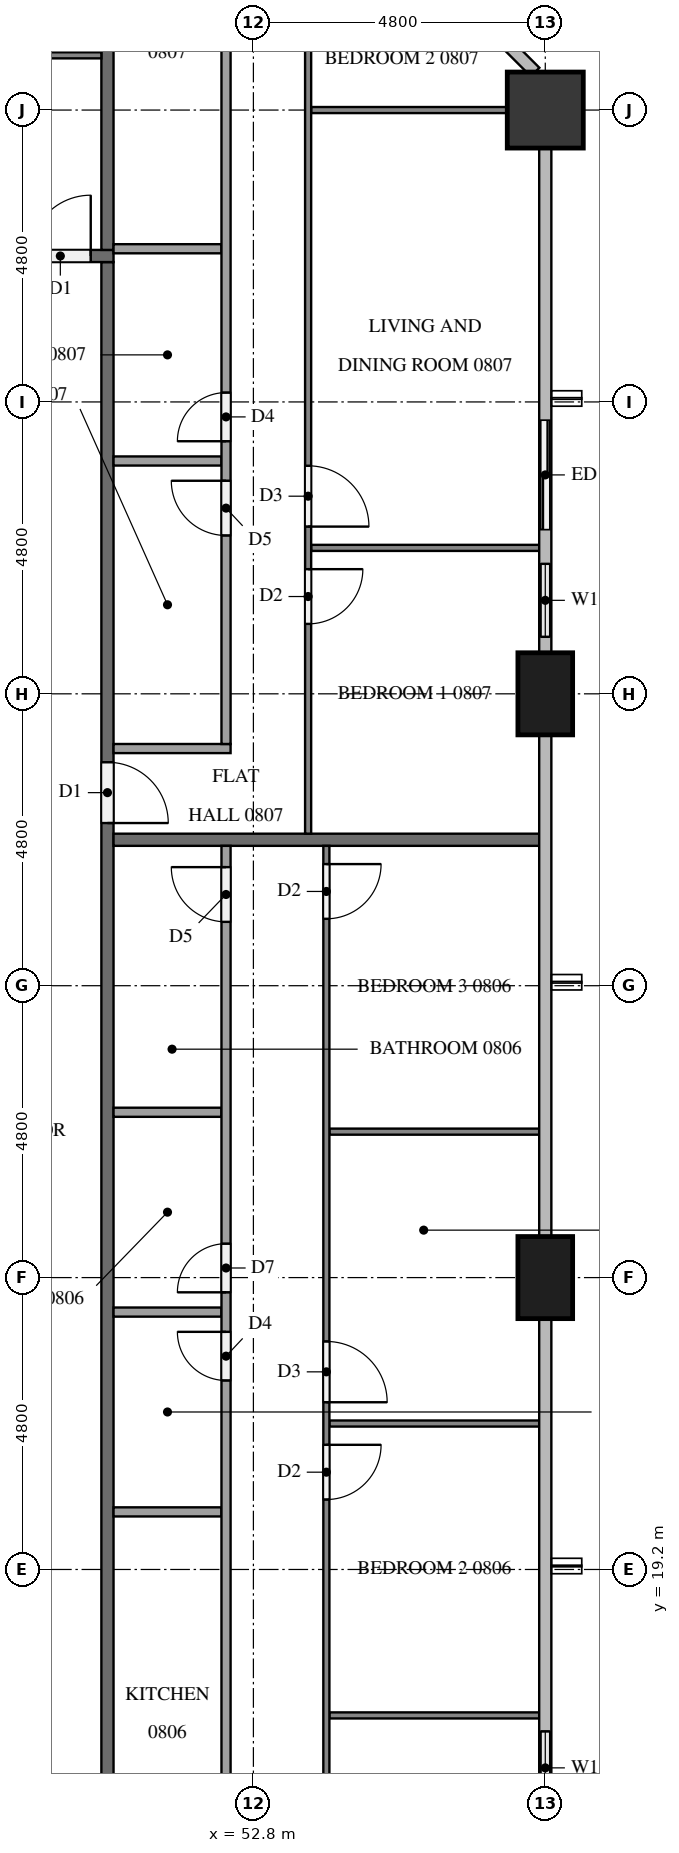
"""IFC4 building model, lengths in metres.
Left out: names, types, materials, properties, quantities, classifications, styles, units other than length and angle.
Written with IfcOpenShell. Run it as: python <this file> out.ifc"""

import sys

from ifc_helpers import new_model, si_unit, direction, frame, frame_2d, origin, origin_2d, place, context, subcontext, project, spatial, rectangle, extrude, element, fill, save


model = new_model("IFC4")
c1 = context("Model", 3, precision=1e-05, world=origin(), true_north=direction((0.0, 1.0)))
c2 = subcontext(c1, "Body", "Model", "MODEL_VIEW")
j1 = project(units=[si_unit("LENGTHUNIT", "METRE"), si_unit("PLANEANGLEUNIT", "RADIAN")], contexts=[c1])
p1 = place(None, origin())
s1 = spatial("IfcSite", under=j1, at=p1, CompositionType="ELEMENT")
p2 = place(p1, origin())
s2 = spatial("IfcBuilding", under=s1, at=p2, CompositionType="ELEMENT")
p3 = place(p2, frame((0.0, 0.0, 36.4)))
s3 = spatial("IfcBuildingStorey", under=s2, at=p3, CompositionType="ELEMENT", Elevation=36.4)
for number, where, z_axis, x_axis in (
    (1, (57.6, 24.0, 0.0), (0.0, 0.0, 1.0), (0.0, 1.0, 0.0)),
    (2, (57.6, 33.6, 0.0), (0.0, 0.0, 1.0), (0.0, 1.0, 0.0)),
):
    element("IfcColumn", number, at=place(p3, frame(where, z_axis=z_axis, x_axis=x_axis)), inside=s3, PredefinedType="COLUMN", context=c2, shape_type="SweptSolid", body=[
        extrude(rectangle(XDim=1.35, YDim=0.9, at=origin_2d()), origin(), (0.0, 0.0, 1.0), 3.2),
    ])
p4 = place(p3, frame((57.6, 43.2, 0.0), z_axis=(0.0, 0.0, 1.0), x_axis=(1.0, 0.0, 0.0)))
e3 = element("IfcColumn", 3, at=p4, inside=s3, PredefinedType="COLUMN", context=c2, shape_type="SweptSolid", body=[
    extrude(rectangle(XDim=1.25, YDim=1.25, at=origin_2d()), origin(), (0.0, 0.0, 1.0), 3.2),
])
p5 = place(p3, frame((57.6, 15.075, 0.0), z_axis=(0.0, 0.0, 1.0), x_axis=(0.0, 1.0, 0.0)))
e4 = element("IfcWall", 4, at=p5, inside=s3, PredefinedType="SOLIDWALL", context=c2, shape_type="SweptSolid", body=[
    extrude(rectangle(XDim=1.725, YDim=0.15, at=frame_2d((0.863, 0.0))), origin(), (0.0, 0.0, 1.0), 3.2),
])
p6 = place(p5, frame((0.262, 0.0, 0.9)))
e5 = element("IfcOpeningElement", 5, at=p6, cuts=e4, PredefinedType="OPENING", context=c2, shape_type="SweptSolid", body=[
    extrude(rectangle(XDim=1.2, YDim=1.4, at=frame_2d((0.6, 0.7))), frame((0.0, 0.085, 0.0), z_axis=(0.0, -1.0, 0.0), x_axis=(1.0, 0.0, 0.0)), (0.0, 0.0, 1.0), 0.17),
])
p7 = place(p3, frame((57.6, 34.275, 0.0), z_axis=(0.0, 0.0, 1.0), x_axis=(0.0, 1.0, 0.0)))
e6 = element("IfcWall", 6, at=p7, inside=s3, PredefinedType="SOLIDWALL", context=c2, shape_type="SweptSolid", body=[
    extrude(rectangle(XDim=4.125, YDim=0.15, at=frame_2d((2.062, 0.0))), origin(), (0.0, 0.0, 1.0), 3.2),
])
p8 = place(p7, frame((0.262, 0.0, 0.9)))
e7 = element("IfcOpeningElement", 7, at=p8, cuts=e6, PredefinedType="OPENING", context=c2, shape_type="SweptSolid", body=[
    extrude(rectangle(XDim=1.2, YDim=1.4, at=frame_2d((0.6, 0.7))), frame((0.0, 0.085, 0.0), z_axis=(0.0, -1.0, 0.0), x_axis=(1.0, 0.0, 0.0)), (0.0, 0.0, 1.0), 0.17),
])
p9 = place(p7, frame((2.025, 0.0, 0.0)))
e8 = element("IfcOpeningElement", 8, at=p9, cuts=e6, PredefinedType="OPENING", context=c2, shape_type="SweptSolid", body=[
    extrude(rectangle(XDim=1.8, YDim=2.4, at=frame_2d((0.9, 1.2))), frame((0.0, 0.085, 0.0), z_axis=(0.0, -1.0, 0.0), x_axis=(1.0, 0.0, 0.0)), (0.0, 0.0, 1.0), 0.17),
])
p10 = place(p3, frame((50.4, 40.7, 0.0), z_axis=(0.0, 0.0, 1.0), x_axis=(0.0, -1.0, 0.0)))
e9 = element("IfcWall", 9, at=p10, inside=s3, PredefinedType="PARTITIONING", context=c2, shape_type="SweptSolid", body=[
    extrude(rectangle(XDim=28.6, YDim=0.2, at=frame_2d((14.3, 0.0))), origin(), (0.0, 0.0, 1.0), 3.2),
])
p11 = place(p10, frame((27.375, 0.0, 0.0)))
e10 = element("IfcOpeningElement", 10, at=p11, cuts=e9, PredefinedType="OPENING", context=c2, shape_type="SweptSolid", body=[
    extrude(rectangle(XDim=1.1, YDim=2.1, at=frame_2d((0.55, 1.05))), frame((0.0, 0.11, 0.0), z_axis=(0.0, -1.0, 0.0), x_axis=(1.0, 0.0, 0.0)), (0.0, 0.0, 1.0), 0.22),
])
p12 = place(p10, frame((8.225, 0.0, 0.0)))
e11 = element("IfcOpeningElement", 11, at=p12, cuts=e9, PredefinedType="OPENING", context=c2, shape_type="SweptSolid", body=[
    extrude(rectangle(XDim=1.0, YDim=2.1, at=frame_2d((0.5, 1.05))), frame((0.0, 0.11, 0.0), z_axis=(0.0, -1.0, 0.0), x_axis=(1.0, 0.0, 0.0)), (0.0, 0.0, 1.0), 0.22),
])
p13 = place(p3, frame((11.9, 40.8, 0.0), z_axis=(0.0, 0.0, 1.0), x_axis=(1.0, 0.0, 0.0)))
e12 = element("IfcWall", 12, at=p13, inside=s3, PredefinedType="PARTITIONING", context=c2, shape_type="SweptSolid", body=[
    extrude(rectangle(XDim=38.6, YDim=0.2, at=frame_2d((19.3, 0.0))), origin(), (0.0, 0.0, 1.0), 3.2),
])
p14 = place(p13, frame((37.225, 0.0, 0.0)))
e13 = element("IfcOpeningElement", 13, at=p14, cuts=e12, PredefinedType="OPENING", context=c2, shape_type="SweptSolid", body=[
    extrude(rectangle(XDim=1.0, YDim=2.1, at=frame_2d((0.5, 1.05))), frame((0.0, 0.11, 0.0), z_axis=(0.0, -1.0, 0.0), x_axis=(1.0, 0.0, 0.0)), (0.0, 0.0, 1.0), 0.22),
])
p15 = place(p13, frame((30.025, 0.0, 0.0)))
e14 = element("IfcOpeningElement", 14, at=p15, cuts=e12, PredefinedType="OPENING", context=c2, shape_type="SweptSolid", body=[
    extrude(rectangle(XDim=1.0, YDim=2.1, at=frame_2d((0.5, 1.05))), frame((0.0, 0.11, 0.0), z_axis=(0.0, -1.0, 0.0), x_axis=(1.0, 0.0, 0.0)), (0.0, 0.0, 1.0), 0.22),
])
p16 = place(p13, frame((2.725, 0.0, 0.0)))
e15 = element("IfcOpeningElement", 15, at=p16, cuts=e12, PredefinedType="OPENING", context=c2, shape_type="SweptSolid", body=[
    extrude(rectangle(XDim=1.1, YDim=2.1, at=frame_2d((0.55, 1.05))), frame((0.0, 0.11, 0.0), z_axis=(0.0, -1.0, 0.0), x_axis=(1.0, 0.0, 0.0)), (0.0, 0.0, 1.0), 0.22),
])
p17 = place(p13, frame((1.225, 0.0, 0.0)))
e16 = element("IfcOpeningElement", 16, at=p17, cuts=e12, PredefinedType="OPENING", context=c2, shape_type="SweptSolid", body=[
    extrude(rectangle(XDim=1.0, YDim=2.1, at=frame_2d((0.5, 1.05))), frame((0.0, 0.11, 0.0), z_axis=(0.0, -1.0, 0.0), x_axis=(1.0, 0.0, 0.0)), (0.0, 0.0, 1.0), 0.22),
])
for number, where, z_axis, x_axis in (
    (17, (50.5, 31.2, 0.0), (0.0, 0.0, 1.0), (1.0, 0.0, 0.0)),
    (18, (50.4, 40.9, 0.0), (0.0, 0.0, 1.0), (0.0, 1.0, 0.0)),
):
    element("IfcWall", number, at=place(p3, frame(where, z_axis=z_axis, x_axis=x_axis)), inside=s3, PredefinedType="PARTITIONING", context=c2, shape_type="SweptSolid", body=[
        extrude(rectangle(XDim=7.0, YDim=0.2, at=frame_2d((3.5, 0.0))), origin(), (0.0, 0.0, 1.0), 3.2),
    ])
for number, where, z_axis, x_axis in (
    (19, (54.05, 16.8, 0.0), (0.0, 0.0, 1.0), (1.0, 0.0, 0.0)),
    (20, (54.05, 21.6, 0.0), (0.0, 0.0, 1.0), (1.0, 0.0, 0.0)),
    (21, (54.05, 26.4, 0.0), (0.0, 0.0, 1.0), (1.0, 0.0, 0.0)),
):
    element("IfcWall", number, at=place(p3, frame(where, z_axis=z_axis, x_axis=x_axis)), inside=s3, PredefinedType="PARTITIONING", context=c2, shape_type="SweptSolid", body=[
        extrude(rectangle(XDim=3.45, YDim=0.1, at=frame_2d((1.725, 0.0))), origin(), (0.0, 0.0, 1.0), 3.2),
    ])
p18 = place(p3, frame((54.0, 31.1, 0.0), z_axis=(0.0, 0.0, 1.0), x_axis=(0.0, -1.0, 0.0)))
e22 = element("IfcWall", 22, at=p18, inside=s3, PredefinedType="PARTITIONING", context=c2, shape_type="SweptSolid", body=[
    extrude(rectangle(XDim=19.0, YDim=0.1, at=frame_2d((9.5, 0.0))), origin(), (0.0, 0.0, 1.0), 3.2),
])
p19 = place(p18, frame((17.8, 0.0, 0.0)))
e23 = element("IfcOpeningElement", 23, at=p19, cuts=e22, PredefinedType="OPENING", context=c2, shape_type="SweptSolid", body=[
    extrude(rectangle(XDim=0.9, YDim=2.1, at=frame_2d((0.45, 1.05))), frame((0.0, 0.06, 0.0), z_axis=(0.0, -1.0, 0.0), x_axis=(1.0, 0.0, 0.0)), (0.0, 0.0, 1.0), 0.12),
])
p20 = place(p18, frame((9.85, 0.0, 0.0)))
e24 = element("IfcOpeningElement", 24, at=p20, cuts=e22, PredefinedType="OPENING", context=c2, shape_type="SweptSolid", body=[
    extrude(rectangle(XDim=0.9, YDim=2.1, at=frame_2d((0.45, 1.05))), frame((0.0, 0.06, 0.0), z_axis=(0.0, -1.0, 0.0), x_axis=(1.0, 0.0, 0.0)), (0.0, 0.0, 1.0), 0.12),
])
p21 = place(p18, frame((8.15, 0.0, 0.0)))
e25 = element("IfcOpeningElement", 25, at=p21, cuts=e22, PredefinedType="OPENING", context=c2, shape_type="SweptSolid", body=[
    extrude(rectangle(XDim=1.0, YDim=2.1, at=frame_2d((0.5, 1.05))), frame((0.0, 0.06, 0.0), z_axis=(0.0, -1.0, 0.0), x_axis=(1.0, 0.0, 0.0)), (0.0, 0.0, 1.0), 0.12),
])
p22 = place(p18, frame((0.3, 0.0, 0.0)))
e26 = element("IfcOpeningElement", 26, at=p22, cuts=e22, PredefinedType="OPENING", context=c2, shape_type="SweptSolid", body=[
    extrude(rectangle(XDim=0.9, YDim=2.1, at=frame_2d((0.45, 1.05))), frame((0.0, 0.06, 0.0), z_axis=(0.0, -1.0, 0.0), x_axis=(1.0, 0.0, 0.0)), (0.0, 0.0, 1.0), 0.12),
])
for number, where, z_axis, x_axis in (
    (27, (50.5, 20.147, 0.0), (0.0, 0.0, 1.0), (1.0, 0.0, 0.0)),
    (28, (50.5, 23.433, 0.0), (0.0, 0.0, 1.0), (1.0, 0.0, 0.0)),
    (29, (50.5, 26.719, 0.0), (0.0, 0.0, 1.0), (1.0, 0.0, 0.0)),
):
    element("IfcWall", number, at=place(p3, frame(where, z_axis=z_axis, x_axis=x_axis)), inside=s3, PredefinedType="PARTITIONING", context=c2, shape_type="SweptSolid", body=[
        extrude(rectangle(XDim=1.775, YDim=0.15, at=frame_2d((0.887, 0.0))), origin(), (0.0, 0.0, 1.0), 3.2),
    ])
p23 = place(p3, frame((52.35, 13.575, 0.0), z_axis=(0.0, 0.0, 1.0), x_axis=(0.0, 1.0, 0.0)))
e30 = element("IfcWall", 30, at=p23, inside=s3, PredefinedType="PARTITIONING", context=c2, shape_type="SweptSolid", body=[
    extrude(rectangle(XDim=17.525, YDim=0.15, at=frame_2d((8.763, 0.0))), origin(), (0.0, 0.0, 1.0), 3.2),
])
p24 = place(p23, frame((0.3, 0.0, 0.0)))
e31 = element("IfcOpeningElement", 31, at=p24, cuts=e30, PredefinedType="OPENING", context=c2, shape_type="SweptSolid", body=[
    extrude(rectangle(XDim=0.9, YDim=2.1, at=frame_2d((0.45, 1.05))), frame((0.0, 0.085, 0.0), z_axis=(0.0, -1.0, 0.0), x_axis=(1.0, 0.0, 0.0)), (0.0, 0.0, 1.0), 0.17),
])
p25 = place(p23, frame((8.733, 0.0, 0.0)))
e32 = element("IfcOpeningElement", 32, at=p25, cuts=e30, PredefinedType="OPENING", context=c2, shape_type="SweptSolid", body=[
    extrude(rectangle(XDim=0.8, YDim=2.1, at=frame_2d((0.4, 1.05))), frame((0.0, 0.085, 0.0), z_axis=(0.0, -1.0, 0.0), x_axis=(1.0, 0.0, 0.0)), (0.0, 0.0, 1.0), 0.17),
])
p26 = place(p23, frame((10.183, 0.0, 0.0)))
e33 = element("IfcOpeningElement", 33, at=p26, cuts=e30, PredefinedType="OPENING", context=c2, shape_type="SweptSolid", body=[
    extrude(rectangle(XDim=0.8, YDim=2.1, at=frame_2d((0.4, 1.05))), frame((0.0, 0.085, 0.0), z_axis=(0.0, -1.0, 0.0), x_axis=(1.0, 0.0, 0.0)), (0.0, 0.0, 1.0), 0.17),
])
p27 = place(p23, frame((16.275, 0.0, 0.0)))
e34 = element("IfcOpeningElement", 34, at=p27, cuts=e30, PredefinedType="OPENING", context=c2, shape_type="SweptSolid", body=[
    extrude(rectangle(XDim=0.9, YDim=2.1, at=frame_2d((0.45, 1.05))), frame((0.0, 0.085, 0.0), z_axis=(0.0, -1.0, 0.0), x_axis=(1.0, 0.0, 0.0)), (0.0, 0.0, 1.0), 0.17),
])
p28 = place(p3, frame((53.75, 36.0, 0.0), z_axis=(0.0, 0.0, 1.0), x_axis=(1.0, 0.0, 0.0)))
e35 = element("IfcWall", 35, at=p28, inside=s3, PredefinedType="PARTITIONING", context=c2, shape_type="SweptSolid", body=[
    extrude(rectangle(XDim=3.75, YDim=0.1, at=frame_2d((1.875, 0.0))), origin(), (0.0, 0.0, 1.0), 3.2),
])
p29 = place(p3, frame((53.75, 43.2, 0.0), z_axis=(0.0, 0.0, 1.0), x_axis=(1.0, 0.0, 0.0)))
e36 = element("IfcWall", 36, at=p29, inside=s3, PredefinedType="PARTITIONING", context=c2, shape_type="SweptSolid", body=[
    extrude(rectangle(XDim=3.225, YDim=0.1, at=frame_2d((1.613, 0.0))), origin(), (0.0, 0.0, 1.0), 3.2),
])
p30 = place(p3, frame((53.7, 47.659, 0.0), z_axis=(0.0, 0.0, 1.0), x_axis=(0.0, -1.0, 0.0)))
e37 = element("IfcWall", 37, at=p30, inside=s3, PredefinedType="PARTITIONING", context=c2, shape_type="SweptSolid", body=[
    extrude(rectangle(XDim=16.359, YDim=0.1, at=frame_2d((8.179, 0.0))), origin(), (0.0, 0.0, 1.0), 3.2),
])
p31 = place(p30, frame((12.009, 0.0, 0.0)))
e38 = element("IfcOpeningElement", 38, at=p31, cuts=e37, PredefinedType="OPENING", context=c2, shape_type="SweptSolid", body=[
    extrude(rectangle(XDim=0.9, YDim=2.1, at=frame_2d((0.45, 1.05))), frame((0.0, 0.06, 0.0), z_axis=(0.0, -1.0, 0.0), x_axis=(1.0, 0.0, 0.0)), (0.0, 0.0, 1.0), 0.12),
])
p32 = place(p30, frame((10.309, 0.0, 0.0)))
e39 = element("IfcOpeningElement", 39, at=p32, cuts=e37, PredefinedType="OPENING", context=c2, shape_type="SweptSolid", body=[
    extrude(rectangle(XDim=1.0, YDim=2.1, at=frame_2d((0.5, 1.05))), frame((0.0, 0.06, 0.0), z_axis=(0.0, -1.0, 0.0), x_axis=(1.0, 0.0, 0.0)), (0.0, 0.0, 1.0), 0.12),
])
p33 = place(p30, frame((0.3, 0.0, 0.0)))
e40 = element("IfcOpeningElement", 40, at=p33, cuts=e37, PredefinedType="OPENING", context=c2, shape_type="SweptSolid", body=[
    extrude(rectangle(XDim=0.9, YDim=2.1, at=frame_2d((0.45, 1.05))), frame((0.0, 0.06, 0.0), z_axis=(0.0, -1.0, 0.0), x_axis=(1.0, 0.0, 0.0)), (0.0, 0.0, 1.0), 0.12),
])
for number, where, z_axis, x_axis in (
    (41, (50.5, 37.429, 0.0), (0.0, 0.0, 1.0), (1.0, 0.0, 0.0)),
    (42, (50.5, 40.919, 0.0), (0.0, 0.0, 1.0), (1.0, 0.0, 0.0)),
):
    element("IfcWall", number, at=place(p3, frame(where, z_axis=z_axis, x_axis=x_axis)), inside=s3, PredefinedType="PARTITIONING", context=c2, shape_type="SweptSolid", body=[
        extrude(rectangle(XDim=1.775, YDim=0.15, at=frame_2d((0.887, 0.0))), origin(), (0.0, 0.0, 1.0), 3.2),
    ])
p34 = place(p3, frame((50.5, 32.7, 0.0), z_axis=(0.0, 0.0, 1.0), x_axis=(1.0, 0.0, 0.0)))
e43 = element("IfcWall", 43, at=p34, inside=s3, PredefinedType="PARTITIONING", context=c2, shape_type="SweptSolid", body=[
    extrude(rectangle(XDim=1.925, YDim=0.15, at=frame_2d((0.962, 0.0))), origin(), (0.0, 0.0, 1.0), 3.2),
])
p35 = place(p3, frame((52.35, 32.775, 0.0), z_axis=(0.0, 0.0, 1.0), x_axis=(0.0, 1.0, 0.0)))
e44 = element("IfcWall", 44, at=p35, inside=s3, PredefinedType="PARTITIONING", context=c2, shape_type="SweptSolid", body=[
    extrude(rectangle(XDim=14.6, YDim=0.15, at=frame_2d((7.3, 0.0))), origin(), (0.0, 0.0, 1.0), 3.2),
])
p36 = place(p35, frame((3.429, 0.0, 0.0)))
e45 = element("IfcOpeningElement", 45, at=p36, cuts=e44, PredefinedType="OPENING", context=c2, shape_type="SweptSolid", body=[
    extrude(rectangle(XDim=0.9, YDim=2.1, at=frame_2d((0.45, 1.05))), frame((0.0, 0.085, 0.0), z_axis=(0.0, -1.0, 0.0), x_axis=(1.0, 0.0, 0.0)), (0.0, 0.0, 1.0), 0.17),
])
p37 = place(p35, frame((4.979, 0.0, 0.0)))
e46 = element("IfcOpeningElement", 46, at=p37, cuts=e44, PredefinedType="OPENING", context=c2, shape_type="SweptSolid", body=[
    extrude(rectangle(XDim=0.8, YDim=2.1, at=frame_2d((0.4, 1.05))), frame((0.0, 0.085, 0.0), z_axis=(0.0, -1.0, 0.0), x_axis=(1.0, 0.0, 0.0)), (0.0, 0.0, 1.0), 0.17),
])
p38 = place(p35, frame((13.4, 0.0, 0.0)))
e47 = element("IfcOpeningElement", 47, at=p38, cuts=e44, PredefinedType="OPENING", context=c2, shape_type="SweptSolid", body=[
    extrude(rectangle(XDim=0.9, YDim=2.1, at=frame_2d((0.45, 1.05))), frame((0.0, 0.085, 0.0), z_axis=(0.0, -1.0, 0.0), x_axis=(1.0, 0.0, 0.0)), (0.0, 0.0, 1.0), 0.17),
])
p39 = place(p3, frame((43.3, 44.1, 0.0), z_axis=(0.0, 0.0, 1.0), x_axis=(1.0, 0.0, 0.0)))
e48 = element("IfcWall", 48, at=p39, inside=s3, PredefinedType="PARTITIONING", context=c2, shape_type="SweptSolid", body=[
    extrude(rectangle(XDim=7.0, YDim=0.1, at=frame_2d((3.5, 0.0))), origin(), (0.0, 0.0, 1.0), 3.2),
])
p40 = place(p39, frame((0.3, 0.0, 0.0)))
e49 = element("IfcOpeningElement", 49, at=p40, cuts=e48, PredefinedType="OPENING", context=c2, shape_type="SweptSolid", body=[
    extrude(rectangle(XDim=1.0, YDim=2.1, at=frame_2d((0.5, 1.05))), frame((0.0, 0.06, 0.0), z_axis=(0.0, -1.0, 0.0), x_axis=(1.0, 0.0, 0.0)), (0.0, 0.0, 1.0), 0.12),
])
p41 = place(p6, origin())
e50 = element("IfcWindow", 50, at=p41, inside=s3, PartitioningType="SINGLE_PANEL", PredefinedType="WINDOW", context=c2, shape_type="SweptSolid", body=[
    extrude(rectangle(XDim=1.2, YDim=1.4, at=frame_2d((0.6, 0.7))), frame((0.0, 0.03, 0.0), z_axis=(0.0, -1.0, 0.0), x_axis=(1.0, 0.0, 0.0)), (0.0, 0.0, 1.0), 0.06),
])
fill(e5, e50)
p42 = place(p8, origin())
e51 = element("IfcWindow", 51, at=p42, inside=s3, PartitioningType="SINGLE_PANEL", PredefinedType="WINDOW", context=c2, shape_type="SweptSolid", body=[
    extrude(rectangle(XDim=1.2, YDim=1.4, at=frame_2d((0.6, 0.7))), frame((0.0, 0.03, 0.0), z_axis=(0.0, -1.0, 0.0), x_axis=(1.0, 0.0, 0.0)), (0.0, 0.0, 1.0), 0.06),
])
fill(e7, e51)
p43 = place(p9, origin())
e52 = element("IfcDoor", 52, at=p43, inside=s3, OperationType="SLIDING_TO_RIGHT", PredefinedType="DOOR", context=c2, shape_type="SweptSolid", body=[
    extrude(rectangle(XDim=1.8, YDim=2.4, at=frame_2d((0.9, 1.2))), frame((0.0, 0.025, 0.0), z_axis=(0.0, -1.0, 0.0), x_axis=(1.0, 0.0, 0.0)), (0.0, 0.0, 1.0), 0.05),
])
fill(e8, e52)
p44 = place(p12, origin())
e53 = element("IfcDoor", 53, at=p44, inside=s3, OperationType="SINGLE_SWING_RIGHT", PredefinedType="DOOR", context=c2, shape_type="SweptSolid", body=[
    extrude(rectangle(XDim=1.0, YDim=2.1, at=frame_2d((0.5, 1.05))), frame((0.0, 0.025, 0.0), z_axis=(0.0, -1.0, 0.0), x_axis=(1.0, 0.0, 0.0)), (0.0, 0.0, 1.0), 0.05),
])
fill(e11, e53)
p45 = place(p14, origin())
e54 = element("IfcDoor", 54, at=p45, inside=s3, OperationType="SINGLE_SWING_RIGHT", PredefinedType="DOOR", context=c2, shape_type="SweptSolid", body=[
    extrude(rectangle(XDim=1.0, YDim=2.1, at=frame_2d((0.5, 1.05))), frame((0.0, 0.025, 0.0), z_axis=(0.0, -1.0, 0.0), x_axis=(1.0, 0.0, 0.0)), (0.0, 0.0, 1.0), 0.05),
])
fill(e13, e54)
p46 = place(p20, origin())
e55 = element("IfcDoor", 55, at=p46, inside=s3, OperationType="SINGLE_SWING_LEFT", PredefinedType="DOOR", context=c2, shape_type="SweptSolid", body=[
    extrude(rectangle(XDim=0.9, YDim=2.1, at=frame_2d((0.45, 1.05))), frame((0.0, 0.025, 0.0), z_axis=(0.0, -1.0, 0.0), x_axis=(1.0, 0.0, 0.0)), (0.0, 0.0, 1.0), 0.05),
])
fill(e24, e55)
p47 = place(p21, origin())
e56 = element("IfcDoor", 56, at=p47, inside=s3, OperationType="SINGLE_SWING_RIGHT", PredefinedType="DOOR", context=c2, shape_type="SweptSolid", body=[
    extrude(rectangle(XDim=1.0, YDim=2.1, at=frame_2d((0.5, 1.05))), frame((0.0, 0.025, 0.0), z_axis=(0.0, -1.0, 0.0), x_axis=(1.0, 0.0, 0.0)), (0.0, 0.0, 1.0), 0.05),
])
fill(e25, e56)
p48 = place(p22, origin())
e57 = element("IfcDoor", 57, at=p48, inside=s3, OperationType="SINGLE_SWING_LEFT", PredefinedType="DOOR", context=c2, shape_type="SweptSolid", body=[
    extrude(rectangle(XDim=0.9, YDim=2.1, at=frame_2d((0.45, 1.05))), frame((0.0, 0.025, 0.0), z_axis=(0.0, -1.0, 0.0), x_axis=(1.0, 0.0, 0.0)), (0.0, 0.0, 1.0), 0.05),
])
fill(e26, e57)
p49 = place(p25, origin())
e58 = element("IfcDoor", 58, at=p49, inside=s3, OperationType="SINGLE_SWING_RIGHT", PredefinedType="DOOR", context=c2, shape_type="SweptSolid", body=[
    extrude(rectangle(XDim=0.8, YDim=2.1, at=frame_2d((0.4, 1.05))), frame((0.0, 0.025, 0.0), z_axis=(0.0, -1.0, 0.0), x_axis=(1.0, 0.0, 0.0)), (0.0, 0.0, 1.0), 0.05),
])
fill(e32, e58)
p50 = place(p26, origin())
e59 = element("IfcDoor", 59, at=p50, inside=s3, OperationType="SINGLE_SWING_LEFT", PredefinedType="DOOR", context=c2, shape_type="SweptSolid", body=[
    extrude(rectangle(XDim=0.8, YDim=2.1, at=frame_2d((0.4, 1.05))), frame((0.0, 0.025, 0.0), z_axis=(0.0, -1.0, 0.0), x_axis=(1.0, 0.0, 0.0)), (0.0, 0.0, 1.0), 0.05),
])
fill(e33, e59)
p51 = place(p27, origin())
e60 = element("IfcDoor", 60, at=p51, inside=s3, OperationType="SINGLE_SWING_RIGHT", PredefinedType="DOOR", context=c2, shape_type="SweptSolid", body=[
    extrude(rectangle(XDim=0.9, YDim=2.1, at=frame_2d((0.45, 1.05))), frame((0.0, 0.025, 0.0), z_axis=(0.0, -1.0, 0.0), x_axis=(1.0, 0.0, 0.0)), (0.0, 0.0, 1.0), 0.05),
])
fill(e34, e60)
p52 = place(p31, origin())
e61 = element("IfcDoor", 61, at=p52, inside=s3, OperationType="SINGLE_SWING_LEFT", PredefinedType="DOOR", context=c2, shape_type="SweptSolid", body=[
    extrude(rectangle(XDim=0.9, YDim=2.1, at=frame_2d((0.45, 1.05))), frame((0.0, 0.025, 0.0), z_axis=(0.0, -1.0, 0.0), x_axis=(1.0, 0.0, 0.0)), (0.0, 0.0, 1.0), 0.05),
])
fill(e38, e61)
p53 = place(p32, origin())
e62 = element("IfcDoor", 62, at=p53, inside=s3, OperationType="SINGLE_SWING_RIGHT", PredefinedType="DOOR", context=c2, shape_type="SweptSolid", body=[
    extrude(rectangle(XDim=1.0, YDim=2.1, at=frame_2d((0.5, 1.05))), frame((0.0, 0.025, 0.0), z_axis=(0.0, -1.0, 0.0), x_axis=(1.0, 0.0, 0.0)), (0.0, 0.0, 1.0), 0.05),
])
fill(e39, e62)
p54 = place(p36, origin())
e63 = element("IfcDoor", 63, at=p54, inside=s3, OperationType="SINGLE_SWING_RIGHT", PredefinedType="DOOR", context=c2, shape_type="SweptSolid", body=[
    extrude(rectangle(XDim=0.9, YDim=2.1, at=frame_2d((0.45, 1.05))), frame((0.0, 0.025, 0.0), z_axis=(0.0, -1.0, 0.0), x_axis=(1.0, 0.0, 0.0)), (0.0, 0.0, 1.0), 0.05),
])
fill(e45, e63)
p55 = place(p37, origin())
e64 = element("IfcDoor", 64, at=p55, inside=s3, OperationType="SINGLE_SWING_LEFT", PredefinedType="DOOR", context=c2, shape_type="SweptSolid", body=[
    extrude(rectangle(XDim=0.8, YDim=2.1, at=frame_2d((0.4, 1.05))), frame((0.0, 0.025, 0.0), z_axis=(0.0, -1.0, 0.0), x_axis=(1.0, 0.0, 0.0)), (0.0, 0.0, 1.0), 0.05),
])
fill(e46, e64)
save(model, sys.argv[1])
